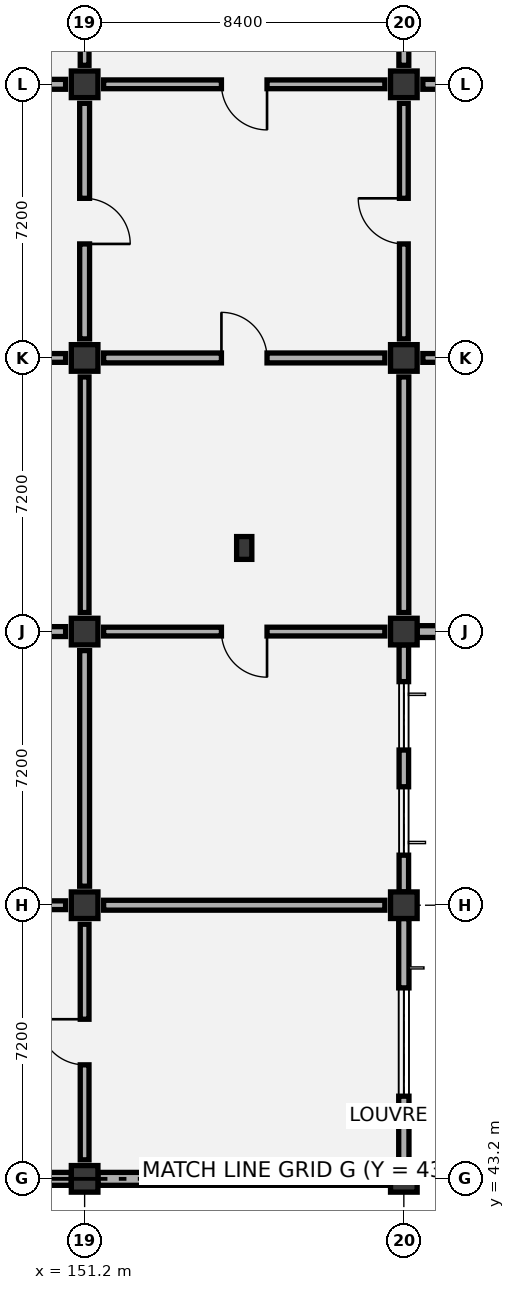
"""IFC4 building model, lengths in metres.
Left out: names, types, materials, properties, quantities, classifications, styles, units other than length and angle.
Written with IfcOpenShell. Run it as: python <this file> out.ifc"""

import sys

from ifc_helpers import new_model, si_unit, direction, frame, frame_2d, origin, origin_2d, place, context, subcontext, project, spatial, rectangle, extrude, element, fill, save


model = new_model("IFC4")
c1 = context("Model", 3, precision=1e-05, world=origin(), true_north=direction((0.0, 1.0)))
c2 = subcontext(c1, "Body", "Model", "MODEL_VIEW")
j1 = project(units=[si_unit("LENGTHUNIT", "METRE"), si_unit("PLANEANGLEUNIT", "RADIAN")], contexts=[c1])
p1 = place(None, origin())
s1 = spatial("IfcSite", under=j1, at=p1, CompositionType="ELEMENT")
p2 = place(p1, origin())
s2 = spatial("IfcBuilding", under=s1, at=p2, CompositionType="ELEMENT")
p3 = place(p2, origin())
s3 = spatial("IfcBuildingStorey", under=s2, at=p3, CompositionType="ELEMENT", Elevation=0.0)
for number, where, z_axis, x_axis in (
    (1, (151.2, 43.2, 0.0), (0.0, 0.0, 1.0), (1.0, 0.0, 0.0)),
    (2, (151.2, 50.4, 0.0), (0.0, 0.0, 1.0), (1.0, 0.0, 0.0)),
    (3, (151.2, 57.6, 0.0), (0.0, 0.0, 1.0), (1.0, 0.0, 0.0)),
    (4, (151.2, 64.8, 0.0), (0.0, 0.0, 1.0), (1.0, 0.0, 0.0)),
    (5, (151.2, 72.0, 0.0), (0.0, 0.0, 1.0), (1.0, 0.0, 0.0)),
    (6, (159.6, 43.2, 0.0), (0.0, 0.0, 1.0), (1.0, 0.0, 0.0)),
    (7, (159.6, 50.4, 0.0), (0.0, 0.0, 1.0), (1.0, 0.0, 0.0)),
    (8, (159.6, 57.6, 0.0), (0.0, 0.0, 1.0), (1.0, 0.0, 0.0)),
    (9, (159.6, 64.8, 0.0), (0.0, 0.0, 1.0), (1.0, 0.0, 0.0)),
    (10, (159.6, 72.0, 0.0), (0.0, 0.0, 1.0), (1.0, 0.0, 0.0)),
):
    element("IfcColumn", number, at=place(p3, frame(where, z_axis=z_axis, x_axis=x_axis)), inside=s3, PredefinedType="COLUMN", context=c2, shape_type="SweptSolid", body=[
        extrude(rectangle(XDim=0.7, YDim=0.7, at=origin_2d()), origin(), (0.0, 0.0, 1.0), 6.0),
    ])
p4 = place(p3, frame((155.4, 59.8, 0.0), z_axis=(0.0, 0.0, 1.0), x_axis=(1.0, 0.0, 0.0)))
e11 = element("IfcColumn", 11, at=p4, inside=s3, PredefinedType="PILASTER", context=c2, shape_type="SweptSolid", body=[
    extrude(rectangle(XDim=0.4, YDim=0.6, at=origin_2d()), origin(), (0.0, 0.0, 1.0), 6.0),
])
p5 = place(p3, frame((143.15, 43.2, 0.0), z_axis=(0.0, 0.0, 1.0), x_axis=(1.0, 0.0, 0.0)))
e12 = element("IfcWall", 12, at=p5, inside=s3, PredefinedType="SOLIDWALL", context=c2, shape_type="SweptSolid", body=[
    extrude(rectangle(XDim=7.7, YDim=0.34, at=frame_2d((3.85, 0.0))), origin(), (0.0, 0.0, 1.0), 5.02),
])
p6 = place(p3, frame((151.55, 43.2, 0.0), z_axis=(0.0, 0.0, 1.0), x_axis=(1.0, 0.0, 0.0)))
e13 = element("IfcWall", 13, at=p6, inside=s3, PredefinedType="SOLIDWALL", context=c2, shape_type="SweptSolid", body=[
    extrude(rectangle(XDim=7.7, YDim=0.34, at=frame_2d((3.85, 0.0))), origin(), (0.0, 0.0, 1.0), 5.02),
])
p7 = place(p3, frame((159.6, 43.55, 0.0), z_axis=(0.0, 0.0, 1.0), x_axis=(0.0, 1.0, 0.0)))
e14 = element("IfcWall", 14, at=p7, inside=s3, PredefinedType="SOLIDWALL", context=c2, shape_type="SweptSolid", body=[
    extrude(rectangle(XDim=6.5, YDim=0.27, at=frame_2d((3.25, 0.0))), origin(), (0.0, 0.0, 1.0), 5.02),
])
p8 = place(p7, frame((1.825, 0.0, 0.9)))
e15 = element("IfcOpeningElement", 15, at=p8, cuts=e14, PredefinedType="OPENING", context=c2, shape_type="SweptSolid", body=[
    extrude(rectangle(XDim=2.85, YDim=1.95, at=frame_2d((1.425, 0.975))), frame((0.0, 0.145, 0.0), z_axis=(0.0, -1.0, 0.0), x_axis=(1.0, 0.0, 0.0)), (0.0, 0.0, 1.0), 0.29),
])
p9 = place(p3, frame((159.6, 50.75, 0.0), z_axis=(0.0, 0.0, 1.0), x_axis=(0.0, 1.0, 0.0)))
e16 = element("IfcWall", 16, at=p9, inside=s3, PredefinedType="SOLIDWALL", context=c2, shape_type="SweptSolid", body=[
    extrude(rectangle(XDim=6.5, YDim=0.25, at=frame_2d((3.25, 0.0))), origin(), (0.0, 0.0, 1.0), 5.02),
])
p10 = place(p9, frame((0.967, 0.0, 0.9)))
e17 = element("IfcOpeningElement", 17, at=p10, cuts=e16, PredefinedType="OPENING", context=c2, shape_type="SweptSolid", body=[
    extrude(rectangle(XDim=1.8, YDim=2.1, at=frame_2d((0.9, 1.05))), frame((0.0, 0.135, 0.0), z_axis=(0.0, -1.0, 0.0), x_axis=(1.0, 0.0, 0.0)), (0.0, 0.0, 1.0), 0.27),
])
p11 = place(p9, frame((3.733, 0.0, 0.9)))
e18 = element("IfcOpeningElement", 18, at=p11, cuts=e16, PredefinedType="OPENING", context=c2, shape_type="SweptSolid", body=[
    extrude(rectangle(XDim=1.8, YDim=2.1, at=frame_2d((0.9, 1.05))), frame((0.0, 0.135, 0.0), z_axis=(0.0, -1.0, 0.0), x_axis=(1.0, 0.0, 0.0)), (0.0, 0.0, 1.0), 0.27),
])
p12 = place(p3, frame((159.95, 57.6, 0.0), z_axis=(0.0, 0.0, 1.0), x_axis=(1.0, 0.0, 0.0)))
e19 = element("IfcWall", 19, at=p12, inside=s3, PredefinedType="SOLIDWALL", context=c2, shape_type="SweptSolid", body=[
    extrude(rectangle(XDim=7.65, YDim=0.31, at=frame_2d((3.825, 0.0))), origin(), (0.0, 0.0, 1.0), 5.02),
])
p13 = place(p12, frame((1.35, 0.0, 0.9)))
e20 = element("IfcOpeningElement", 20, at=p13, cuts=e19, PredefinedType="OPENING", context=c2, shape_type="SweptSolid", body=[
    extrude(rectangle(XDim=1.8, YDim=2.1, at=frame_2d((0.9, 1.05))), frame((0.0, 0.165, 0.0), z_axis=(0.0, -1.0, 0.0), x_axis=(1.0, 0.0, 0.0)), (0.0, 0.0, 1.0), 0.33),
])
p14 = place(p12, frame((4.5, 0.0, 0.9)))
e21 = element("IfcOpeningElement", 21, at=p14, cuts=e19, PredefinedType="OPENING", context=c2, shape_type="SweptSolid", body=[
    extrude(rectangle(XDim=1.8, YDim=2.1, at=frame_2d((0.9, 1.05))), frame((0.0, 0.165, 0.0), z_axis=(0.0, -1.0, 0.0), x_axis=(1.0, 0.0, 0.0)), (0.0, 0.0, 1.0), 0.33),
])
p15 = place(p3, frame((159.72, 43.2, 0.0), z_axis=(0.0, 0.0, 1.0), x_axis=(1.0, 0.0, 0.0)))
e22 = element("IfcWall", 22, at=p15, inside=s3, PredefinedType="PARAPET", context=c2, shape_type="SweptSolid", body=[
    extrude(rectangle(XDim=8.16, YDim=0.22, at=frame_2d((4.08, 0.0))), origin(), (0.0, 0.0, 1.0), 1.15),
])
p16 = place(p3, frame((151.2, 43.7, 0.0), z_axis=(0.0, 0.0, 1.0), x_axis=(0.0, 1.0, 0.0)))
e23 = element("IfcWall", 23, at=p16, inside=s3, PredefinedType="PARTITIONING", context=c2, shape_type="SweptSolid", body=[
    extrude(rectangle(XDim=6.2, YDim=0.23, at=frame_2d((3.1, 0.0))), origin(), (0.0, 0.0, 1.0), 5.27),
])
p17 = place(p16, frame((2.5, 0.0, 0.0)))
e24 = element("IfcOpeningElement", 24, at=p17, cuts=e23, PredefinedType="OPENING", context=c2, shape_type="SweptSolid", body=[
    extrude(rectangle(XDim=1.2, YDim=2.1, at=frame_2d((0.6, 1.05))), frame((0.0, 0.125, 0.0), z_axis=(0.0, -1.0, 0.0), x_axis=(1.0, 0.0, 0.0)), (0.0, 0.0, 1.0), 0.25),
])
p18 = place(p3, frame((143.3, 50.4, 0.0), z_axis=(0.0, 0.0, 1.0), x_axis=(1.0, 0.0, 0.0)))
e25 = element("IfcWall", 25, at=p18, inside=s3, PredefinedType="PARTITIONING", context=c2, shape_type="SweptSolid", body=[
    extrude(rectangle(XDim=7.4, YDim=0.23, at=frame_2d((3.7, 0.0))), origin(), (0.0, 0.0, 1.0), 4.87),
])
p19 = place(p3, frame((151.2, 50.9, 0.0), z_axis=(0.0, 0.0, 1.0), x_axis=(0.0, 1.0, 0.0)))
e26 = element("IfcWall", 26, at=p19, inside=s3, PredefinedType="PARTITIONING", context=c2, shape_type="SweptSolid", body=[
    extrude(rectangle(XDim=6.2, YDim=0.26, at=frame_2d((3.1, 0.0))), origin(), (0.0, 0.0, 1.0), 4.92),
])
p20 = place(p3, frame((143.3, 57.6, 0.0), z_axis=(0.0, 0.0, 1.0), x_axis=(1.0, 0.0, 0.0)))
e27 = element("IfcWall", 27, at=p20, inside=s3, PredefinedType="PARTITIONING", context=c2, shape_type="SweptSolid", body=[
    extrude(rectangle(XDim=7.4, YDim=0.26, at=frame_2d((3.7, 0.0))), origin(), (0.0, 0.0, 1.0), 4.87),
])
p21 = place(p20, frame((3.1, 0.0, 0.0)))
e28 = element("IfcOpeningElement", 28, at=p21, cuts=e27, PredefinedType="OPENING", context=c2, shape_type="SweptSolid", body=[
    extrude(rectangle(XDim=1.2, YDim=2.1, at=frame_2d((0.6, 1.05))), frame((0.0, 0.14, 0.0), z_axis=(0.0, -1.0, 0.0), x_axis=(1.0, 0.0, 0.0)), (0.0, 0.0, 1.0), 0.28),
])
p22 = place(p3, frame((151.2, 58.1, 0.0), z_axis=(0.0, 0.0, 1.0), x_axis=(0.0, 1.0, 0.0)))
e29 = element("IfcWall", 29, at=p22, inside=s3, PredefinedType="PARTITIONING", context=c2, shape_type="SweptSolid", body=[
    extrude(rectangle(XDim=6.2, YDim=0.23, at=frame_2d((3.1, 0.0))), origin(), (0.0, 0.0, 1.0), 5.38),
])
p23 = place(p3, frame((143.3, 64.8, 0.0), z_axis=(0.0, 0.0, 1.0), x_axis=(1.0, 0.0, 0.0)))
e30 = element("IfcWall", 30, at=p23, inside=s3, PredefinedType="PARTITIONING", context=c2, shape_type="SweptSolid", body=[
    extrude(rectangle(XDim=7.4, YDim=0.23, at=frame_2d((3.7, 0.0))), origin(), (0.0, 0.0, 1.0), 4.87),
])
p24 = place(p23, frame((3.1, 0.0, 0.0)))
e31 = element("IfcOpeningElement", 31, at=p24, cuts=e30, PredefinedType="OPENING", context=c2, shape_type="SweptSolid", body=[
    extrude(rectangle(XDim=1.2, YDim=2.1, at=frame_2d((0.6, 1.05))), frame((0.0, 0.125, 0.0), z_axis=(0.0, -1.0, 0.0), x_axis=(1.0, 0.0, 0.0)), (0.0, 0.0, 1.0), 0.25),
])
p25 = place(p3, frame((151.2, 65.3, 0.0), z_axis=(0.0, 0.0, 1.0), x_axis=(0.0, 1.0, 0.0)))
e32 = element("IfcWall", 32, at=p25, inside=s3, PredefinedType="PARTITIONING", context=c2, shape_type="SweptSolid", body=[
    extrude(rectangle(XDim=6.2, YDim=0.26, at=frame_2d((3.1, 0.0))), origin(), (0.0, 0.0, 1.0), 4.92),
])
p26 = place(p25, frame((2.5, 0.0, 0.0)))
e33 = element("IfcOpeningElement", 33, at=p26, cuts=e32, PredefinedType="OPENING", context=c2, shape_type="SweptSolid", body=[
    extrude(rectangle(XDim=1.2, YDim=2.1, at=frame_2d((0.6, 1.05))), frame((0.0, 0.14, 0.0), z_axis=(0.0, -1.0, 0.0), x_axis=(1.0, 0.0, 0.0)), (0.0, 0.0, 1.0), 0.28),
])
p27 = place(p3, frame((143.3, 72.0, 0.0), z_axis=(0.0, 0.0, 1.0), x_axis=(1.0, 0.0, 0.0)))
e34 = element("IfcWall", 34, at=p27, inside=s3, PredefinedType="PARTITIONING", context=c2, shape_type="SweptSolid", body=[
    extrude(rectangle(XDim=7.4, YDim=0.26, at=frame_2d((3.7, 0.0))), origin(), (0.0, 0.0, 1.0), 4.87),
])
p28 = place(p27, frame((3.1, 0.0, 0.0)))
e35 = element("IfcOpeningElement", 35, at=p28, cuts=e34, PredefinedType="OPENING", context=c2, shape_type="SweptSolid", body=[
    extrude(rectangle(XDim=1.2, YDim=2.1, at=frame_2d((0.6, 1.05))), frame((0.0, 0.14, 0.0), z_axis=(0.0, -1.0, 0.0), x_axis=(1.0, 0.0, 0.0)), (0.0, 0.0, 1.0), 0.28),
])
p29 = place(p3, frame((151.2, 72.5, 0.0), z_axis=(0.0, 0.0, 1.0), x_axis=(0.0, 1.0, 0.0)))
e36 = element("IfcWall", 36, at=p29, inside=s3, PredefinedType="PARTITIONING", context=c2, shape_type="SweptSolid", body=[
    extrude(rectangle(XDim=6.2, YDim=0.23, at=frame_2d((3.1, 0.0))), origin(), (0.0, 0.0, 1.0), 5.17),
])
p30 = place(p3, frame((151.7, 50.4, 0.0), z_axis=(0.0, 0.0, 1.0), x_axis=(1.0, 0.0, 0.0)))
e37 = element("IfcWall", 37, at=p30, inside=s3, PredefinedType="PARTITIONING", context=c2, shape_type="SweptSolid", body=[
    extrude(rectangle(XDim=7.4, YDim=0.26, at=frame_2d((3.7, 0.0))), origin(), (0.0, 0.0, 1.0), 4.87),
])
p31 = place(p3, frame((151.7, 57.6, 0.0), z_axis=(0.0, 0.0, 1.0), x_axis=(1.0, 0.0, 0.0)))
e38 = element("IfcWall", 38, at=p31, inside=s3, PredefinedType="PARTITIONING", context=c2, shape_type="SweptSolid", body=[
    extrude(rectangle(XDim=7.4, YDim=0.23, at=frame_2d((3.7, 0.0))), origin(), (0.0, 0.0, 1.0), 4.87),
])
p32 = place(p31, frame((3.1, 0.0, 0.0)))
e39 = element("IfcOpeningElement", 39, at=p32, cuts=e38, PredefinedType="OPENING", context=c2, shape_type="SweptSolid", body=[
    extrude(rectangle(XDim=1.2, YDim=2.1, at=frame_2d((0.6, 1.05))), frame((0.0, 0.125, 0.0), z_axis=(0.0, -1.0, 0.0), x_axis=(1.0, 0.0, 0.0)), (0.0, 0.0, 1.0), 0.25),
])
p33 = place(p3, frame((159.6, 58.1, 0.0), z_axis=(0.0, 0.0, 1.0), x_axis=(0.0, 1.0, 0.0)))
e40 = element("IfcWall", 40, at=p33, inside=s3, PredefinedType="PARTITIONING", context=c2, shape_type="SweptSolid", body=[
    extrude(rectangle(XDim=6.2, YDim=0.26, at=frame_2d((3.1, 0.0))), origin(), (0.0, 0.0, 1.0), 4.92),
])
p34 = place(p3, frame((151.7, 64.8, 0.0), z_axis=(0.0, 0.0, 1.0), x_axis=(1.0, 0.0, 0.0)))
e41 = element("IfcWall", 41, at=p34, inside=s3, PredefinedType="PARTITIONING", context=c2, shape_type="SweptSolid", body=[
    extrude(rectangle(XDim=7.4, YDim=0.26, at=frame_2d((3.7, 0.0))), origin(), (0.0, 0.0, 1.0), 4.87),
])
p35 = place(p34, frame((3.1, 0.0, 0.0)))
e42 = element("IfcOpeningElement", 42, at=p35, cuts=e41, PredefinedType="OPENING", context=c2, shape_type="SweptSolid", body=[
    extrude(rectangle(XDim=1.2, YDim=2.1, at=frame_2d((0.6, 1.05))), frame((0.0, 0.14, 0.0), z_axis=(0.0, -1.0, 0.0), x_axis=(1.0, 0.0, 0.0)), (0.0, 0.0, 1.0), 0.28),
])
p36 = place(p3, frame((159.6, 65.3, 0.0), z_axis=(0.0, 0.0, 1.0), x_axis=(0.0, 1.0, 0.0)))
e43 = element("IfcWall", 43, at=p36, inside=s3, PredefinedType="PARTITIONING", context=c2, shape_type="SweptSolid", body=[
    extrude(rectangle(XDim=6.2, YDim=0.23, at=frame_2d((3.1, 0.0))), origin(), (0.0, 0.0, 1.0), 5.17),
])
p37 = place(p36, frame((2.5, 0.0, 0.0)))
e44 = element("IfcOpeningElement", 44, at=p37, cuts=e43, PredefinedType="OPENING", context=c2, shape_type="SweptSolid", body=[
    extrude(rectangle(XDim=1.2, YDim=2.1, at=frame_2d((0.6, 1.05))), frame((0.0, 0.125, 0.0), z_axis=(0.0, -1.0, 0.0), x_axis=(1.0, 0.0, 0.0)), (0.0, 0.0, 1.0), 0.25),
])
p38 = place(p3, frame((151.7, 72.0, 0.0), z_axis=(0.0, 0.0, 1.0), x_axis=(1.0, 0.0, 0.0)))
e45 = element("IfcWall", 45, at=p38, inside=s3, PredefinedType="PARTITIONING", context=c2, shape_type="SweptSolid", body=[
    extrude(rectangle(XDim=7.4, YDim=0.23, at=frame_2d((3.7, 0.0))), origin(), (0.0, 0.0, 1.0), 4.87),
])
p39 = place(p38, frame((3.1, 0.0, 0.0)))
e46 = element("IfcOpeningElement", 46, at=p39, cuts=e45, PredefinedType="OPENING", context=c2, shape_type="SweptSolid", body=[
    extrude(rectangle(XDim=1.2, YDim=2.1, at=frame_2d((0.6, 1.05))), frame((0.0, 0.125, 0.0), z_axis=(0.0, -1.0, 0.0), x_axis=(1.0, 0.0, 0.0)), (0.0, 0.0, 1.0), 0.25),
])
p40 = place(p3, frame((159.6, 72.5, 0.0), z_axis=(0.0, 0.0, 1.0), x_axis=(0.0, 1.0, 0.0)))
e47 = element("IfcWall", 47, at=p40, inside=s3, PredefinedType="PARTITIONING", context=c2, shape_type="SweptSolid", body=[
    extrude(rectangle(XDim=6.2, YDim=0.26, at=frame_2d((3.1, 0.0))), origin(), (0.0, 0.0, 1.0), 4.92),
])
p41 = place(p3, frame((160.1, 64.8, 0.0), z_axis=(0.0, 0.0, 1.0), x_axis=(1.0, 0.0, 0.0)))
e48 = element("IfcWall", 48, at=p41, inside=s3, PredefinedType="PARTITIONING", context=c2, shape_type="SweptSolid", body=[
    extrude(rectangle(XDim=7.4, YDim=0.23, at=frame_2d((3.7, 0.0))), origin(), (0.0, 0.0, 1.0), 4.87),
])
p42 = place(p41, frame((3.1, 0.0, 0.0)))
e49 = element("IfcOpeningElement", 49, at=p42, cuts=e48, PredefinedType="OPENING", context=c2, shape_type="SweptSolid", body=[
    extrude(rectangle(XDim=1.2, YDim=2.1, at=frame_2d((0.6, 1.05))), frame((0.0, 0.125, 0.0), z_axis=(0.0, -1.0, 0.0), x_axis=(1.0, 0.0, 0.0)), (0.0, 0.0, 1.0), 0.25),
])
p43 = place(p3, frame((160.1, 72.0, 0.0), z_axis=(0.0, 0.0, 1.0), x_axis=(1.0, 0.0, 0.0)))
e50 = element("IfcWall", 50, at=p43, inside=s3, PredefinedType="PARTITIONING", context=c2, shape_type="SweptSolid", body=[
    extrude(rectangle(XDim=7.4, YDim=0.26, at=frame_2d((3.7, 0.0))), origin(), (0.0, 0.0, 1.0), 4.87),
])
p44 = place(p43, frame((3.1, 0.0, 0.0)))
e51 = element("IfcOpeningElement", 51, at=p44, cuts=e50, PredefinedType="OPENING", context=c2, shape_type="SweptSolid", body=[
    extrude(rectangle(XDim=1.2, YDim=2.1, at=frame_2d((0.6, 1.05))), frame((0.0, 0.14, 0.0), z_axis=(0.0, -1.0, 0.0), x_axis=(1.0, 0.0, 0.0)), (0.0, 0.0, 1.0), 0.28),
])
p45 = place(p8, origin())
e52 = element("IfcWindow", 52, at=p45, inside=s3, PartitioningType="SINGLE_PANEL", PredefinedType="WINDOW", context=c2, shape_type="SweptSolid", body=[
    extrude(rectangle(XDim=2.85, YDim=1.95, at=frame_2d((1.425, 0.975))), frame((0.0, 0.03, 0.0), z_axis=(0.0, -1.0, 0.0), x_axis=(1.0, 0.0, 0.0)), (0.0, 0.0, 1.0), 0.06),
])
fill(e15, e52)
p46 = place(p10, origin())
e53 = element("IfcWindow", 53, at=p46, inside=s3, PartitioningType="SINGLE_PANEL", PredefinedType="WINDOW", context=c2, shape_type="SweptSolid", body=[
    extrude(rectangle(XDim=1.8, YDim=2.1, at=frame_2d((0.9, 1.05))), frame((0.0, 0.03, 0.0), z_axis=(0.0, -1.0, 0.0), x_axis=(1.0, 0.0, 0.0)), (0.0, 0.0, 1.0), 0.06),
])
fill(e17, e53)
p47 = place(p11, origin())
e54 = element("IfcWindow", 54, at=p47, inside=s3, PartitioningType="SINGLE_PANEL", PredefinedType="WINDOW", context=c2, shape_type="SweptSolid", body=[
    extrude(rectangle(XDim=1.8, YDim=2.1, at=frame_2d((0.9, 1.05))), frame((0.0, 0.03, 0.0), z_axis=(0.0, -1.0, 0.0), x_axis=(1.0, 0.0, 0.0)), (0.0, 0.0, 1.0), 0.06),
])
fill(e18, e54)
p48 = place(p17, origin())
e55 = element("IfcDoor", 55, at=p48, inside=s3, OperationType="SINGLE_SWING_RIGHT", PredefinedType="DOOR", context=c2, shape_type="SweptSolid", body=[
    extrude(rectangle(XDim=1.2, YDim=2.1, at=frame_2d((0.6, 1.05))), frame((0.0, 0.025, 0.0), z_axis=(0.0, -1.0, 0.0), x_axis=(1.0, 0.0, 0.0)), (0.0, 0.0, 1.0), 0.05),
])
fill(e24, e55)
p49 = place(p26, frame((1.2, 0.0, 0.0), z_axis=(0.0, 0.0, 1.0), x_axis=(-1.0, 0.0, 0.0)))
e56 = element("IfcDoor", 56, at=p49, inside=s3, OperationType="SINGLE_SWING_RIGHT", PredefinedType="DOOR", context=c2, shape_type="SweptSolid", body=[
    extrude(rectangle(XDim=1.2, YDim=2.1, at=frame_2d((0.6, 1.05))), frame((0.0, 0.025, 0.0), z_axis=(0.0, -1.0, 0.0), x_axis=(1.0, 0.0, 0.0)), (0.0, 0.0, 1.0), 0.05),
])
fill(e33, e56)
p50 = place(p32, frame((1.2, 0.0, 0.0), z_axis=(0.0, 0.0, 1.0), x_axis=(-1.0, 0.0, 0.0)))
e57 = element("IfcDoor", 57, at=p50, inside=s3, OperationType="SINGLE_SWING_LEFT", PredefinedType="DOOR", context=c2, shape_type="SweptSolid", body=[
    extrude(rectangle(XDim=1.2, YDim=2.1, at=frame_2d((0.6, 1.05))), frame((0.0, 0.025, 0.0), z_axis=(0.0, -1.0, 0.0), x_axis=(1.0, 0.0, 0.0)), (0.0, 0.0, 1.0), 0.05),
])
fill(e39, e57)
p51 = place(p35, origin())
e58 = element("IfcDoor", 58, at=p51, inside=s3, OperationType="SINGLE_SWING_LEFT", PredefinedType="DOOR", context=c2, shape_type="SweptSolid", body=[
    extrude(rectangle(XDim=1.2, YDim=2.1, at=frame_2d((0.6, 1.05))), frame((0.0, 0.025, 0.0), z_axis=(0.0, -1.0, 0.0), x_axis=(1.0, 0.0, 0.0)), (0.0, 0.0, 1.0), 0.05),
])
fill(e42, e58)
p52 = place(p37, origin())
e59 = element("IfcDoor", 59, at=p52, inside=s3, OperationType="SINGLE_SWING_RIGHT", PredefinedType="DOOR", context=c2, shape_type="SweptSolid", body=[
    extrude(rectangle(XDim=1.2, YDim=2.1, at=frame_2d((0.6, 1.05))), frame((0.0, 0.025, 0.0), z_axis=(0.0, -1.0, 0.0), x_axis=(1.0, 0.0, 0.0)), (0.0, 0.0, 1.0), 0.05),
])
fill(e44, e59)
p53 = place(p39, frame((1.2, 0.0, 0.0), z_axis=(0.0, 0.0, 1.0), x_axis=(-1.0, 0.0, 0.0)))
e60 = element("IfcDoor", 60, at=p53, inside=s3, OperationType="SINGLE_SWING_LEFT", PredefinedType="DOOR", context=c2, shape_type="SweptSolid", body=[
    extrude(rectangle(XDim=1.2, YDim=2.1, at=frame_2d((0.6, 1.05))), frame((0.0, 0.025, 0.0), z_axis=(0.0, -1.0, 0.0), x_axis=(1.0, 0.0, 0.0)), (0.0, 0.0, 1.0), 0.05),
])
fill(e46, e60)
save(model, sys.argv[1])
